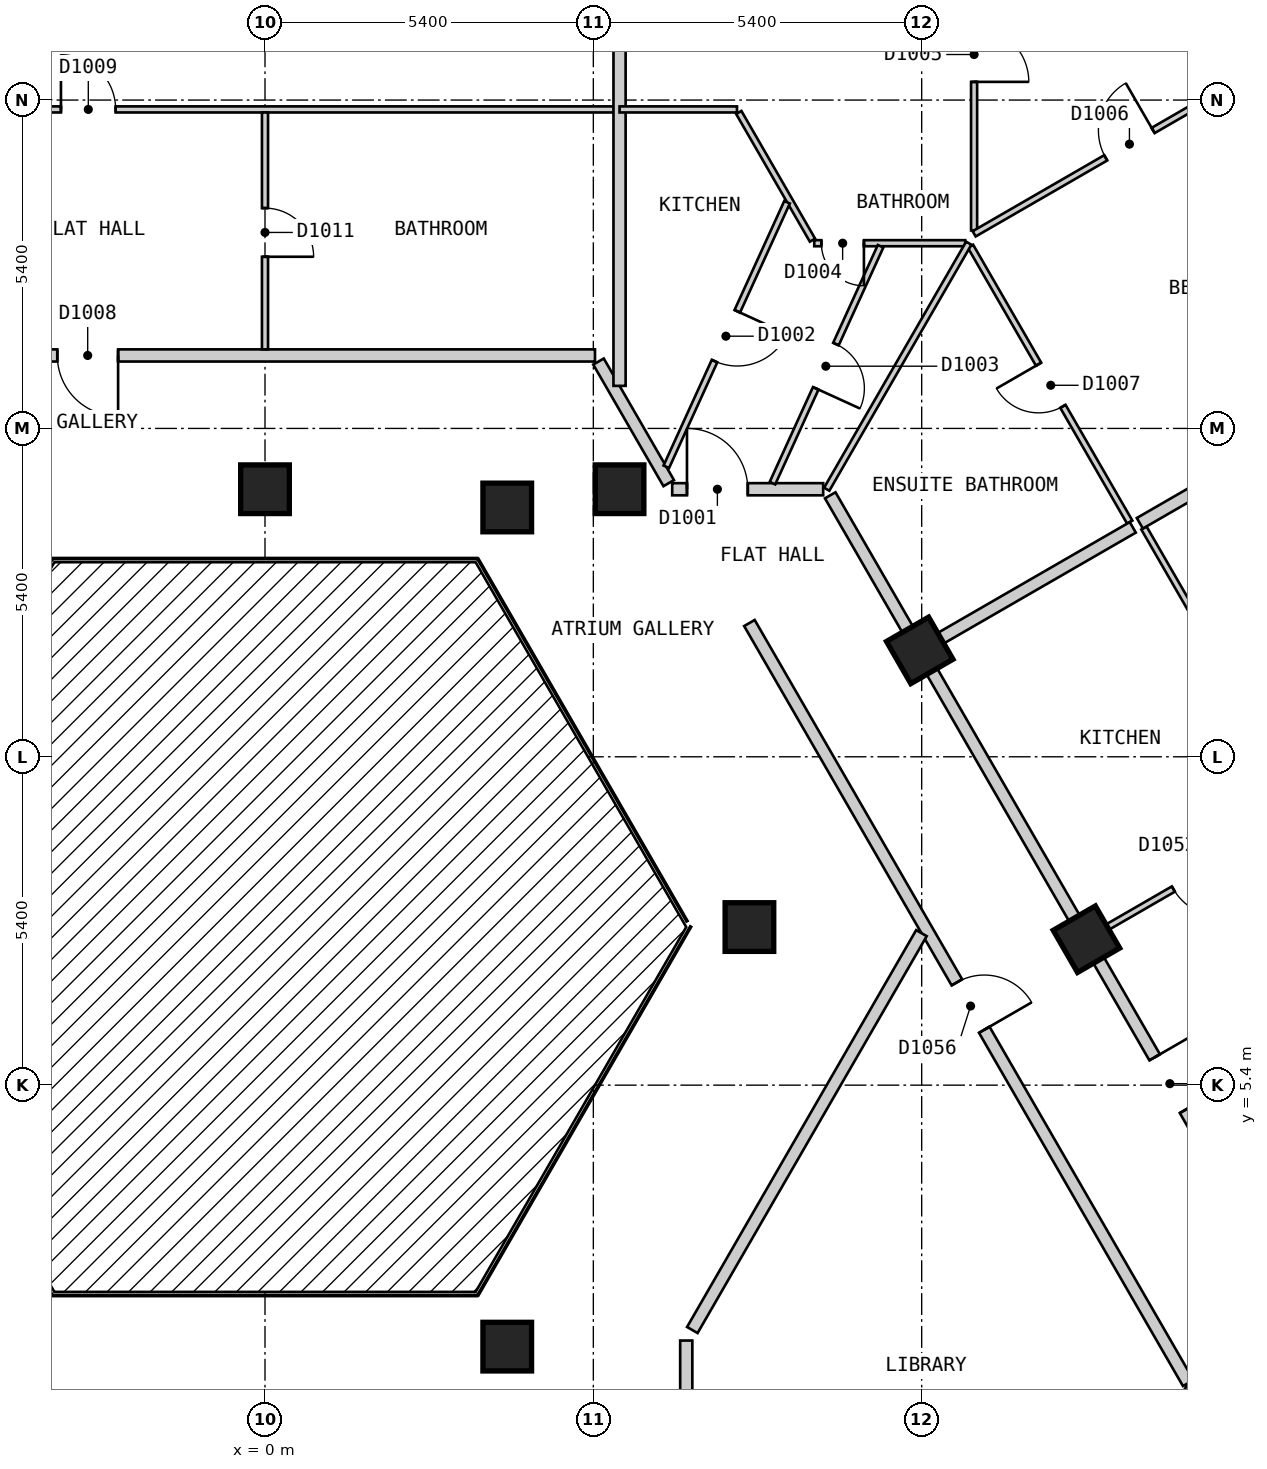
"""IFC4 building model, lengths in metres.
Left out: names, types, materials, properties, quantities, classifications, styles, units other than length and angle.
Written with IfcOpenShell. Run it as: python <this file> out.ifc"""

import sys

from ifc_helpers import new_model, si_unit, direction, frame, frame_2d, origin, origin_2d, place, context, subcontext, project, spatial, rectangle, extrude, element, fill, save


model = new_model("IFC4")
c1 = context("Model", 3, precision=1e-05, world=origin(), true_north=direction((0.0, 1.0)))
c2 = subcontext(c1, "Body", "Model", "MODEL_VIEW")
j1 = project(units=[si_unit("LENGTHUNIT", "METRE"), si_unit("PLANEANGLEUNIT", "RADIAN")], contexts=[c1])
p1 = place(None, origin())
s1 = spatial("IfcSite", under=j1, at=p1, CompositionType="ELEMENT")
p2 = place(p1, origin())
s2 = spatial("IfcBuilding", under=s1, at=p2, CompositionType="ELEMENT")
p3 = place(p2, frame((0.0, 0.0, 126.6)))
s3 = spatial("IfcBuildingStorey", under=s2, at=p3, CompositionType="ELEMENT", Elevation=126.6)
for number, where, z_axis, x_axis in (
    (1, (3.984, 1.1, 0.0), (0.0, 0.0, 1.0), (1.0, 0.0, 0.0)),
    (2, (13.51, 7.8, 0.0), (0.0, 0.0, 1.0), (-0.5, 0.866, 0.0)),
    (3, (7.967, 8.0, 0.0), (0.0, 0.0, 1.0), (1.0, 0.0, 0.0)),
    (4, (10.768, 12.55, 0.0), (0.0, 0.0, 1.0), (-0.5, 0.866, 0.0)),
    (5, (5.831, 15.2, 0.0), (0.0, 0.0, 1.0), (-1.0, 0.0, 0.0)),
    (6, (3.984, 14.9, 0.0), (0.0, 0.0, 1.0), (1.0, 0.0, 0.0)),
    (7, (0.0, 15.2, 0.0), (0.0, 0.0, 1.0), (-1.0, 0.0, 0.0)),
):
    element("IfcColumn", number, at=place(p3, frame(where, z_axis=z_axis, x_axis=x_axis)), inside=s3, PredefinedType="COLUMN", context=c2, shape_type="SweptSolid", body=[
        extrude(rectangle(XDim=0.8, YDim=0.8, at=origin_2d()), origin(), (0.0, 0.0, 1.0), 3.0),
    ])
p4 = place(p3, frame((5.485, 17.3, 0.0), z_axis=(0.0, 0.0, 1.0), x_axis=(0.500027479704, -0.866009537788, 0.0)))
e8 = element("IfcWall", 8, at=p4, inside=s3, PredefinedType="PARTITIONING", context=c2, shape_type="SweptSolid", body=[
    extrude(rectangle(XDim=2.309, YDim=0.2, at=frame_2d((1.155, 0.0))), origin(), (0.0, 0.0, 1.0), 2.7),
])
p5 = place(p3, frame((7.967, 13.0, 0.0), z_axis=(0.0, 0.0, 1.0), x_axis=(0.50003774998, -0.866003607726, 0.0)))
e9 = element("IfcWall", 9, at=p5, inside=s3, PredefinedType="PARTITIONING", context=c2, shape_type="SweptSolid", body=[
    extrude(rectangle(XDim=14.433, YDim=0.2, at=frame_2d((7.217, 0.0))), origin(), (0.0, 0.0, 1.0), 2.7),
])
p6 = place(p5, frame((6.824, 0.0, 0.0)))
e10 = element("IfcOpeningElement", 10, at=p6, cuts=e9, PredefinedType="OPENING", context=c2, shape_type="SweptSolid", body=[
    extrude(rectangle(XDim=0.9, YDim=2.1, at=frame_2d((0.45, 1.05))), frame((0.0, 0.11, 0.0), z_axis=(0.0, -1.0, 0.0), x_axis=(1.0, 0.0, 0.0)), (0.0, 0.0, 1.0), 0.22),
])
p7 = place(p3, frame((9.296, 15.1, 0.0), z_axis=(0.0, 0.0, 1.0), x_axis=(0.499974024244, -0.866040400375, 0.0)))
e11 = element("IfcWall", 11, at=p7, inside=s3, PredefinedType="PARTITIONING", context=c2, shape_type="SweptSolid", body=[
    extrude(rectangle(XDim=16.857, YDim=0.2, at=frame_2d((8.429, 0.0))), origin(), (0.0, 0.0, 1.0), 2.7),
])
p8 = place(p7, frame((10.672, 0.0, 0.0)))
e12 = element("IfcOpeningElement", 12, at=p8, cuts=e11, PredefinedType="OPENING", context=c2, shape_type="SweptSolid", body=[
    extrude(rectangle(XDim=1.0, YDim=2.1, at=frame_2d((0.5, 1.05))), frame((0.0, 0.11, 0.0), z_axis=(0.0, -1.0, 0.0), x_axis=(1.0, 0.0, 0.0)), (0.0, 0.0, 1.0), 0.22),
])
p9 = place(p3, frame((6.697, 15.2, 0.0), z_axis=(0.0, 0.0, 1.0), x_axis=(1.0, 0.0, 0.0)))
e13 = element("IfcWall", 13, at=p9, inside=s3, PredefinedType="PARTITIONING", context=c2, shape_type="SweptSolid", body=[
    extrude(rectangle(XDim=2.483, YDim=0.2, at=frame_2d((1.241, 0.0))), origin(), (0.0, 0.0, 1.0), 2.7),
])
p10 = place(p9, frame((0.243, 0.0, 0.0)))
e14 = element("IfcOpeningElement", 14, at=p10, cuts=e13, PredefinedType="OPENING", context=c2, shape_type="SweptSolid", body=[
    extrude(rectangle(XDim=1.0, YDim=2.1, at=frame_2d((0.5, 1.05))), frame((0.0, 0.11, 0.0), z_axis=(0.0, -1.0, 0.0), x_axis=(1.0, 0.0, 0.0)), (0.0, 0.0, 1.0), 0.22),
])
p11 = place(p3, frame((-5.312, 17.4, 0.0), z_axis=(0.0, 0.0, 1.0), x_axis=(1.0, 0.0, 0.0)))
e15 = element("IfcWall", 15, at=p11, inside=s3, PredefinedType="PARTITIONING", context=c2, shape_type="SweptSolid", body=[
    extrude(rectangle(XDim=10.739, YDim=0.2, at=frame_2d((5.37, 0.0))), origin(), (0.0, 0.0, 1.0), 2.7),
])
p12 = place(p11, frame((1.896, 0.0, 0.0)))
e16 = element("IfcOpeningElement", 16, at=p12, cuts=e15, PredefinedType="OPENING", context=c2, shape_type="SweptSolid", body=[
    extrude(rectangle(XDim=1.0, YDim=2.1, at=frame_2d((0.5, 1.05))), frame((0.0, 0.11, 0.0), z_axis=(0.0, -1.0, 0.0), x_axis=(1.0, 0.0, 0.0)), (0.0, 0.0, 1.0), 0.22),
])
p13 = place(p3, frame((7.028, 1.373, 0.0), z_axis=(0.0, 0.0, 1.0), x_axis=(0.499954271211, 0.866051803703, 0.0)))
e17 = element("IfcWall", 17, at=p13, inside=s3, PredefinedType="PARTITIONING", context=c2, shape_type="SweptSolid", body=[
    extrude(rectangle(XDim=7.536, YDim=0.2, at=frame_2d((3.768, 0.0))), origin(), (0.0, 0.0, 1.0), 2.7),
])
p14 = place(p3, frame((13.394, -2.8, 0.0), z_axis=(0.0, 0.0, 1.0), x_axis=(0.499968324138, 0.866043691079, 0.0)))
e18 = element("IfcWall", 18, at=p14, inside=s3, PredefinedType="PARTITIONING", context=c2, shape_type="SweptSolid", body=[
    extrude(rectangle(XDim=3.696, YDim=0.2, at=frame_2d((1.848, 0.0))), origin(), (0.0, 0.0, 1.0), 2.7),
])
p15 = place(p3, frame((6.928, -2.8, 0.0), z_axis=(0.0, 0.0, 1.0), x_axis=(0.0, 1.0, 0.0)))
e19 = element("IfcWall", 19, at=p15, inside=s3, PredefinedType="PARTITIONING", context=c2, shape_type="SweptSolid", body=[
    extrude(rectangle(XDim=4.0, YDim=0.2, at=frame_2d((2.0, 0.0))), origin(), (0.0, 0.0, 1.0), 2.7),
])
p16 = place(p3, frame((7.792, 21.396, 0.0), z_axis=(0.0, 0.0, 1.0), x_axis=(0.499821239653, -0.866128586522, 0.0)))
e20 = element("IfcWall", 20, at=p16, inside=s3, PredefinedType="PARTITIONING", context=c2, shape_type="SweptSolid", body=[
    extrude(rectangle(XDim=2.425, YDim=0.1, at=frame_2d((1.212, 0.0))), origin(), (0.0, 0.0, 1.0), 2.7),
])
p17 = place(p3, frame((11.603, 19.196, 0.0), z_axis=(0.0, 0.0, 1.0), x_axis=(0.499913406181, -0.866075392977, 0.0)))
e21 = element("IfcWall", 21, at=p17, inside=s3, PredefinedType="PARTITIONING", context=c2, shape_type="SweptSolid", body=[
    extrude(rectangle(XDim=5.239, YDim=0.1, at=frame_2d((2.619, 0.0))), origin(), (0.0, 0.0, 1.0), 2.7),
])
p18 = place(p17, frame((2.24, 0.0, 0.0)))
e22 = element("IfcOpeningElement", 22, at=p18, cuts=e21, PredefinedType="OPENING", context=c2, shape_type="SweptSolid", body=[
    extrude(rectangle(XDim=0.8, YDim=2.1, at=frame_2d((0.4, 1.05))), frame((0.0, 0.06, 0.0), z_axis=(0.0, -1.0, 0.0), x_axis=(1.0, 0.0, 0.0)), (0.0, 0.0, 1.0), 0.12),
])
p19 = place(p3, frame((14.455, 14.563, 0.0), z_axis=(0.0, 0.0, 1.0), x_axis=(0.500009803579, -0.866019743612, 0.0)))
e23 = element("IfcWall", 23, at=p19, inside=s3, PredefinedType="PARTITIONING", context=c2, shape_type="SweptSolid", body=[
    extrude(rectangle(XDim=16.254, YDim=0.1, at=frame_2d((8.127, 0.0))), origin(), (0.0, 0.0, 1.0), 2.7),
])
p20 = place(p19, frame((7.677, 0.0, 0.0)))
e24 = element("IfcOpeningElement", 24, at=p20, cuts=e23, PredefinedType="OPENING", context=c2, shape_type="SweptSolid", body=[
    extrude(rectangle(XDim=0.9, YDim=2.1, at=frame_2d((0.45, 1.05))), frame((0.0, 0.06, 0.0), z_axis=(0.0, -1.0, 0.0), x_axis=(1.0, 0.0, 0.0)), (0.0, 0.0, 1.0), 0.12),
])
p21 = place(p3, frame((9.033, 19.246, 0.0), z_axis=(0.0, 0.0, 1.0), x_axis=(1.0, 0.0, 0.0)))
e25 = element("IfcWall", 25, at=p21, inside=s3, PredefinedType="PARTITIONING", context=c2, shape_type="SweptSolid", body=[
    extrude(rectangle(XDim=2.483, YDim=0.1, at=frame_2d((1.242, 0.0))), origin(), (0.0, 0.0, 1.0), 2.7),
])
p22 = place(p21, frame((0.117, 0.0, 0.0)))
e26 = element("IfcOpeningElement", 26, at=p22, cuts=e25, PredefinedType="OPENING", context=c2, shape_type="SweptSolid", body=[
    extrude(rectangle(XDim=0.7, YDim=2.1, at=frame_2d((0.35, 1.05))), frame((0.0, 0.06, 0.0), z_axis=(0.0, -1.0, 0.0), x_axis=(1.0, 0.0, 0.0)), (0.0, 0.0, 1.0), 0.12),
])
p23 = place(p3, frame((-7.706, 21.446, 0.0), z_axis=(0.0, 0.0, 1.0), x_axis=(1.0, 0.0, 0.0)))
e27 = element("IfcWall", 27, at=p23, inside=s3, PredefinedType="PARTITIONING", context=c2, shape_type="SweptSolid", body=[
    extrude(rectangle(XDim=13.537, YDim=0.1, at=frame_2d((6.769, 0.0))), origin(), (0.0, 0.0, 1.0), 2.7),
])
p24 = place(p23, frame((4.35, 0.0, 0.0)))
e28 = element("IfcOpeningElement", 28, at=p24, cuts=e27, PredefinedType="OPENING", context=c2, shape_type="SweptSolid", body=[
    extrude(rectangle(XDim=0.9, YDim=2.1, at=frame_2d((0.45, 1.05))), frame((0.0, 0.06, 0.0), z_axis=(0.0, -1.0, 0.0), x_axis=(1.0, 0.0, 0.0)), (0.0, 0.0, 1.0), 0.12),
])
p25 = place(p3, frame((9.238, 15.2, 0.0), z_axis=(0.0, 0.0, 1.0), x_axis=(0.499983303743, 0.866035043158, 0.0)))
e29 = element("IfcWall", 29, at=p25, inside=s3, PredefinedType="PARTITIONING", context=c2, shape_type="SweptSolid", body=[
    extrude(rectangle(XDim=4.672, YDim=0.1, at=frame_2d((2.336, 0.0))), origin(), (0.0, 0.0, 1.0), 2.7),
])
p26 = place(p3, frame((8.346, 15.3, 0.0), z_axis=(0.0, 0.0, 1.0), x_axis=(0.415189790387, 0.909734817383, 0.0)))
e30 = element("IfcWall", 30, at=p26, inside=s3, PredefinedType="PARTITIONING", context=c2, shape_type="SweptSolid", body=[
    extrude(rectangle(XDim=4.282, YDim=0.1, at=frame_2d((2.141, 0.0))), origin(), (0.0, 0.0, 1.0), 2.7),
])
p27 = place(p26, frame((1.714, 0.0, 0.0)))
e31 = element("IfcOpeningElement", 31, at=p27, cuts=e30, PredefinedType="OPENING", context=c2, shape_type="SweptSolid", body=[
    extrude(rectangle(XDim=0.8, YDim=2.1, at=frame_2d((0.4, 1.05))), frame((0.0, 0.06, 0.0), z_axis=(0.0, -1.0, 0.0), x_axis=(1.0, 0.0, 0.0)), (0.0, 0.0, 1.0), 0.12),
])
p28 = place(p3, frame((6.6, 15.569, 0.0), z_axis=(0.0, 0.0, 1.0), x_axis=(0.415221636251, 0.909720282718, 0.0)))
e32 = element("IfcWall", 32, at=p28, inside=s3, PredefinedType="PARTITIONING", context=c2, shape_type="SweptSolid", body=[
    extrude(rectangle(XDim=4.783, YDim=0.1, at=frame_2d((2.391, 0.0))), origin(), (0.0, 0.0, 1.0), 2.7),
])
p29 = place(p28, frame((1.911, 0.0, 0.0)))
e33 = element("IfcOpeningElement", 33, at=p29, cuts=e32, PredefinedType="OPENING", context=c2, shape_type="SweptSolid", body=[
    extrude(rectangle(XDim=0.9, YDim=2.1, at=frame_2d((0.45, 1.05))), frame((0.0, 0.06, 0.0), z_axis=(0.0, -1.0, 0.0), x_axis=(1.0, 0.0, 0.0)), (0.0, 0.0, 1.0), 0.12),
])
p30 = place(p3, frame((11.662, 19.456, 0.0), z_axis=(0.0, 0.0, 1.0), x_axis=(0.0, 1.0, 0.0)))
e34 = element("IfcWall", 34, at=p30, inside=s3, PredefinedType="PARTITIONING", context=c2, shape_type="SweptSolid", body=[
    extrude(rectangle(XDim=5.844, YDim=0.1, at=frame_2d((2.922, 0.0))), origin(), (0.0, 0.0, 1.0), 2.7),
])
p31 = place(p30, frame((2.443, 0.0, 0.0)))
e35 = element("IfcOpeningElement", 35, at=p31, cuts=e34, PredefinedType="OPENING", context=c2, shape_type="SweptSolid", body=[
    extrude(rectangle(XDim=0.9, YDim=2.1, at=frame_2d((0.45, 1.05))), frame((0.0, 0.06, 0.0), z_axis=(0.0, -1.0, 0.0), x_axis=(1.0, 0.0, 0.0)), (0.0, 0.0, 1.0), 0.12),
])
p32 = place(p3, frame((0.0, 17.5, 0.0), z_axis=(0.0, 0.0, 1.0), x_axis=(0.0, 1.0, 0.0)))
e36 = element("IfcWall", 36, at=p32, inside=s3, PredefinedType="PARTITIONING", context=c2, shape_type="SweptSolid", body=[
    extrude(rectangle(XDim=3.896, YDim=0.1, at=frame_2d((1.948, 0.0))), origin(), (0.0, 0.0, 1.0), 2.7),
])
p33 = place(p32, frame((1.523, 0.0, 0.0)))
e37 = element("IfcOpeningElement", 37, at=p33, cuts=e36, PredefinedType="OPENING", context=c2, shape_type="SweptSolid", body=[
    extrude(rectangle(XDim=0.8, YDim=2.1, at=frame_2d((0.4, 1.05))), frame((0.0, 0.06, 0.0), z_axis=(0.0, -1.0, 0.0), x_axis=(1.0, 0.0, 0.0)), (0.0, 0.0, 1.0), 0.12),
])
p34 = place(p3, frame((13.597, 7.85, 0.0), z_axis=(0.0, 0.0, 1.0), x_axis=(0.866006068523, 0.500033488159, 0.0)))
e38 = element("IfcWall", 38, at=p34, inside=s3, PredefinedType="PARTITIONING", context=c2, shape_type="SweptSolid", body=[
    extrude(rectangle(XDim=4.099, YDim=0.1, at=frame_2d((2.05, 0.0))), origin(), (0.0, 0.0, 1.0), 2.7),
])
p35 = place(p34, frame((1.55, 0.0, 0.0)))
e39 = element("IfcOpeningElement", 39, at=p35, cuts=e38, PredefinedType="OPENING", context=c2, shape_type="SweptSolid", body=[
    extrude(rectangle(XDim=0.9, YDim=2.1, at=frame_2d((0.45, 1.05))), frame((0.0, 0.06, 0.0), z_axis=(0.0, -1.0, 0.0), x_axis=(1.0, 0.0, 0.0)), (0.0, 0.0, 1.0), 0.12),
])
p36 = place(p3, frame((11.663, 19.4, 0.0), z_axis=(0.0, 0.0, 1.0), x_axis=(0.865941558533, 0.500145196124, 0.0)))
e40 = element("IfcWall", 40, at=p36, inside=s3, PredefinedType="PARTITIONING", context=c2, shape_type="SweptSolid", body=[
    extrude(rectangle(XDim=5.899, YDim=0.1, at=frame_2d((2.949, 0.0))), origin(), (0.0, 0.0, 1.0), 2.7),
])
p37 = place(p36, frame((2.499, 0.0, 0.0)))
e41 = element("IfcOpeningElement", 41, at=p37, cuts=e40, PredefinedType="OPENING", context=c2, shape_type="SweptSolid", body=[
    extrude(rectangle(XDim=0.9, YDim=2.1, at=frame_2d((0.45, 1.05))), frame((0.0, 0.06, 0.0), z_axis=(0.0, -1.0, 0.0), x_axis=(1.0, 0.0, 0.0)), (0.0, 0.0, 1.0), 0.12),
])
p38 = place(p3, frame((5.831, 16.9, 0.0), z_axis=(0.0, 0.0, 1.0), x_axis=(0.0, 1.0, 0.0)))
e42 = element("IfcWall", 42, at=p38, inside=s3, PredefinedType="PARTITIONING", context=c2, shape_type="SweptSolid", body=[
    extrude(rectangle(XDim=8.4, YDim=0.2, at=frame_2d((4.2, 0.0))), origin(), (0.0, 0.0, 1.0), 2.7),
])
p39 = place(p3, frame((10.854, 12.6, 0.0), z_axis=(0.0, 0.0, 1.0), x_axis=(0.866076396086, 0.499911668341, 0.0)))
e43 = element("IfcWall", 43, at=p39, inside=s3, PredefinedType="PARTITIONING", context=c2, shape_type="SweptSolid", body=[
    extrude(rectangle(XDim=3.947, YDim=0.2, at=frame_2d((1.973, 0.0))), origin(), (0.0, 0.0, 1.0), 2.7),
])
p40 = place(p3, frame((14.388, 14.64, 0.0), z_axis=(0.0, 0.0, 1.0), x_axis=(0.866044090212, 0.499967632761, 0.0)))
e44 = element("IfcWall", 44, at=p40, inside=s3, PredefinedType="PARTITIONING", context=c2, shape_type="SweptSolid", body=[
    extrude(rectangle(XDim=5.919, YDim=0.2, at=frame_2d((2.959, 0.0))), origin(), (0.0, 0.0, 1.0), 2.7),
])
p41 = place(p3, frame((5.831, 21.446, 0.0), z_axis=(0.0, 0.0, 1.0), x_axis=(1.0, 0.0, 0.0)))
e45 = element("IfcWall", 45, at=p41, inside=s3, PredefinedType="PARTITIONING", context=c2, shape_type="SweptSolid", body=[
    extrude(rectangle(XDim=1.932, YDim=0.1, at=frame_2d((0.966, 0.0))), origin(), (0.0, 0.0, 1.0), 2.7),
])
p42 = place(p10, origin())
e46 = element("IfcDoor", 46, at=p42, inside=s3, OperationType="SINGLE_SWING_LEFT", PredefinedType="DOOR", context=c2, shape_type="SweptSolid", body=[
    extrude(rectangle(XDim=1.0, YDim=2.1, at=frame_2d((0.5, 1.05))), frame((0.0, 0.025, 0.0), z_axis=(0.0, -1.0, 0.0), x_axis=(1.0, 0.0, 0.0)), (0.0, 0.0, 1.0), 0.05),
])
fill(e14, e46)
p43 = place(p29, origin())
e47 = element("IfcDoor", 47, at=p43, inside=s3, OperationType="SINGLE_SWING_RIGHT", PredefinedType="DOOR", context=c2, shape_type="SweptSolid", body=[
    extrude(rectangle(XDim=0.9, YDim=2.1, at=frame_2d((0.45, 1.05))), frame((0.0, 0.025, 0.0), z_axis=(0.0, -1.0, 0.0), x_axis=(1.0, 0.0, 0.0)), (0.0, 0.0, 1.0), 0.05),
])
fill(e33, e47)
p44 = place(p27, origin())
e48 = element("IfcDoor", 48, at=p44, inside=s3, OperationType="SINGLE_SWING_LEFT", PredefinedType="DOOR", context=c2, shape_type="SweptSolid", body=[
    extrude(rectangle(XDim=0.8, YDim=2.1, at=frame_2d((0.4, 1.05))), frame((0.0, 0.025, 0.0), z_axis=(0.0, -1.0, 0.0), x_axis=(1.0, 0.0, 0.0)), (0.0, 0.0, 1.0), 0.05),
])
fill(e31, e48)
p45 = place(p22, origin())
e49 = element("IfcDoor", 49, at=p45, inside=s3, OperationType="SINGLE_SWING_RIGHT", PredefinedType="DOOR", context=c2, shape_type="SweptSolid", body=[
    extrude(rectangle(XDim=0.7, YDim=2.1, at=frame_2d((0.35, 1.05))), frame((0.0, 0.025, 0.0), z_axis=(0.0, -1.0, 0.0), x_axis=(1.0, 0.0, 0.0)), (0.0, 0.0, 1.0), 0.05),
])
fill(e26, e49)
p46 = place(p31, origin())
e50 = element("IfcDoor", 50, at=p46, inside=s3, OperationType="SINGLE_SWING_LEFT", PredefinedType="DOOR", context=c2, shape_type="SweptSolid", body=[
    extrude(rectangle(XDim=0.9, YDim=2.1, at=frame_2d((0.45, 1.05))), frame((0.0, 0.025, 0.0), z_axis=(0.0, -1.0, 0.0), x_axis=(1.0, 0.0, 0.0)), (0.0, 0.0, 1.0), 0.05),
])
fill(e35, e50)
p47 = place(p37, origin())
e51 = element("IfcDoor", 51, at=p47, inside=s3, OperationType="SINGLE_SWING_RIGHT", PredefinedType="DOOR", context=c2, shape_type="SweptSolid", body=[
    extrude(rectangle(XDim=0.9, YDim=2.1, at=frame_2d((0.45, 1.05))), frame((0.0, 0.025, 0.0), z_axis=(0.0, -1.0, 0.0), x_axis=(1.0, 0.0, 0.0)), (0.0, 0.0, 1.0), 0.05),
])
fill(e41, e51)
p48 = place(p18, origin())
e52 = element("IfcDoor", 52, at=p48, inside=s3, OperationType="SINGLE_SWING_LEFT", PredefinedType="DOOR", context=c2, shape_type="SweptSolid", body=[
    extrude(rectangle(XDim=0.8, YDim=2.1, at=frame_2d((0.4, 1.05))), frame((0.0, 0.025, 0.0), z_axis=(0.0, -1.0, 0.0), x_axis=(1.0, 0.0, 0.0)), (0.0, 0.0, 1.0), 0.05),
])
fill(e22, e52)
p49 = place(p12, origin())
e53 = element("IfcDoor", 53, at=p49, inside=s3, OperationType="SINGLE_SWING_RIGHT", PredefinedType="DOOR", context=c2, shape_type="SweptSolid", body=[
    extrude(rectangle(XDim=1.0, YDim=2.1, at=frame_2d((0.5, 1.05))), frame((0.0, 0.025, 0.0), z_axis=(0.0, -1.0, 0.0), x_axis=(1.0, 0.0, 0.0)), (0.0, 0.0, 1.0), 0.05),
])
fill(e16, e53)
p50 = place(p24, origin())
e54 = element("IfcDoor", 54, at=p50, inside=s3, OperationType="SINGLE_SWING_LEFT", PredefinedType="DOOR", context=c2, shape_type="SweptSolid", body=[
    extrude(rectangle(XDim=0.9, YDim=2.1, at=frame_2d((0.45, 1.05))), frame((0.0, 0.025, 0.0), z_axis=(0.0, -1.0, 0.0), x_axis=(1.0, 0.0, 0.0)), (0.0, 0.0, 1.0), 0.05),
])
fill(e28, e54)
p51 = place(p33, origin())
e55 = element("IfcDoor", 55, at=p51, inside=s3, OperationType="SINGLE_SWING_LEFT", PredefinedType="DOOR", context=c2, shape_type="SweptSolid", body=[
    extrude(rectangle(XDim=0.8, YDim=2.1, at=frame_2d((0.4, 1.05))), frame((0.0, 0.025, 0.0), z_axis=(0.0, -1.0, 0.0), x_axis=(1.0, 0.0, 0.0)), (0.0, 0.0, 1.0), 0.05),
])
fill(e37, e55)
p52 = place(p8, origin())
e56 = element("IfcDoor", 56, at=p52, inside=s3, OperationType="SINGLE_SWING_LEFT", PredefinedType="DOOR", context=c2, shape_type="SweptSolid", body=[
    extrude(rectangle(XDim=1.0, YDim=2.1, at=frame_2d((0.5, 1.05))), frame((0.0, 0.025, 0.0), z_axis=(0.0, -1.0, 0.0), x_axis=(1.0, 0.0, 0.0)), (0.0, 0.0, 1.0), 0.05),
])
fill(e12, e56)
p53 = place(p35, origin())
e57 = element("IfcDoor", 57, at=p53, inside=s3, OperationType="SINGLE_SWING_RIGHT", PredefinedType="DOOR", context=c2, shape_type="SweptSolid", body=[
    extrude(rectangle(XDim=0.9, YDim=2.1, at=frame_2d((0.45, 1.05))), frame((0.0, 0.025, 0.0), z_axis=(0.0, -1.0, 0.0), x_axis=(1.0, 0.0, 0.0)), (0.0, 0.0, 1.0), 0.05),
])
fill(e39, e57)
p54 = place(p6, origin())
e58 = element("IfcDoor", 58, at=p54, inside=s3, OperationType="SINGLE_SWING_RIGHT", PredefinedType="DOOR", context=c2, shape_type="SweptSolid", body=[
    extrude(rectangle(XDim=0.9, YDim=2.1, at=frame_2d((0.45, 1.05))), frame((0.0, 0.025, 0.0), z_axis=(0.0, -1.0, 0.0), x_axis=(1.0, 0.0, 0.0)), (0.0, 0.0, 1.0), 0.05),
])
fill(e10, e58)
save(model, sys.argv[1])
